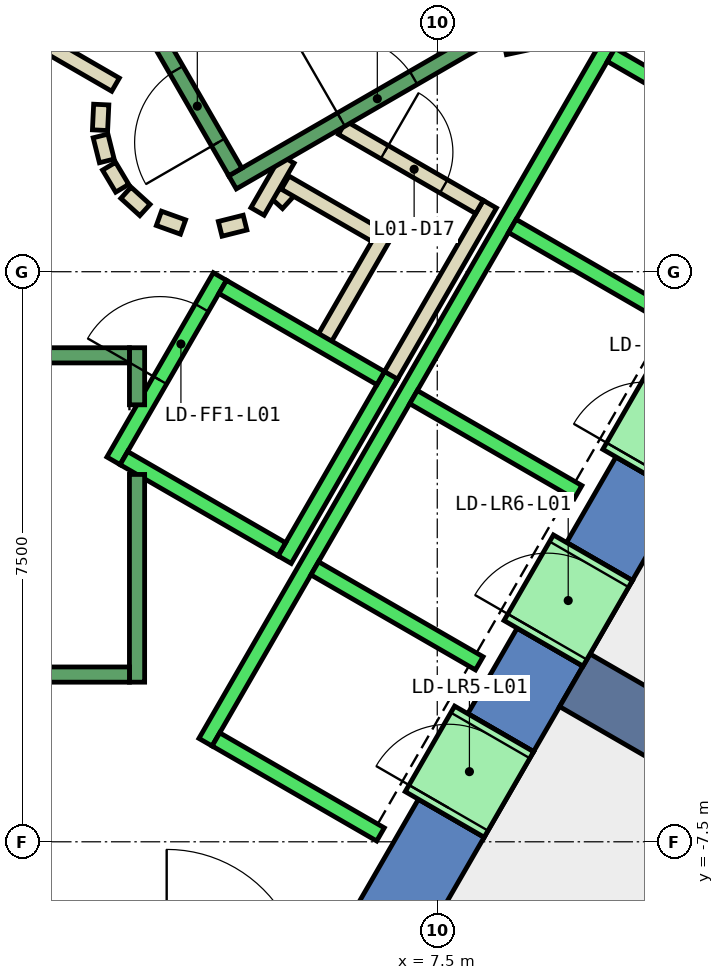
"""IFC4 building model, lengths in metres.
Left out: names, types, materials, properties, quantities, classifications, styles, units other than length and angle.
Written with IfcOpenShell. Run it as: python <this file> out.ifc"""

import sys

from ifc_helpers import new_model, si_unit, direction, frame, frame_2d, origin, place, context, subcontext, project, spatial, polyline, rectangle, outline, extrude, element, fill, save


model = new_model("IFC4")
c1 = context("Model", 3, precision=1e-05, world=origin(), true_north=direction((0.0, 1.0)))
c2 = subcontext(c1, "Body", "Model", "MODEL_VIEW")
j1 = project(units=[si_unit("LENGTHUNIT", "METRE"), si_unit("PLANEANGLEUNIT", "RADIAN")], contexts=[c1])
p1 = place(None, origin())
s1 = spatial("IfcSite", under=j1, at=p1, CompositionType="ELEMENT")
p2 = place(p1, origin())
s2 = spatial("IfcBuilding", under=s1, at=p2, CompositionType="ELEMENT")
p3 = place(p2, frame((0.0, 0.0, 9.0)))
s3 = spatial("IfcBuildingStorey", under=s2, at=p3, CompositionType="ELEMENT", Elevation=9.0)
p4 = place(p3, frame((0.0, 0.0, -0.45)))
e1 = element("IfcWall", 1, at=p4, inside=s3, PredefinedType="SHEAR", context=c2, shape_type="SweptSolid", body=[
    extrude(outline(polyline([(8.517, 11.748), (7.651, 11.248), (12.702, 2.5), (13.856, 2.5), (8.517, 11.748)])), origin(), (0.0, 0.0, 1.0), 6.0),
])
p5 = place(p3, frame((0.0, 0.0, -0.45)))
e2 = element("IfcWall", 2, at=p5, inside=s3, PredefinedType="SHEAR", context=c2, shape_type="SweptSolid", body=[
    extrude(outline(polyline([(8.117, -7.44), (7.252, -6.94), (6.351, -8.5), (6.928, -9.5), (8.117, -7.44)])), origin(), (0.0, 0.0, 1.0), 6.0),
])
p6 = place(p3, frame((0.0, 0.0, -0.45)))
e3 = element("IfcWall", 3, at=p6, inside=s3, PredefinedType="SHEAR", context=c2, shape_type="SweptSolid", body=[
    extrude(outline(polyline([(9.417, -5.189), (8.551, -4.689), (7.902, -5.814), (8.767, -6.314), (9.417, -5.189)])), origin(), (0.0, 0.0, 1.0), 6.0),
])
p7 = place(p3, frame((0.0, 0.0, -0.45)))
e4 = element("IfcWall", 4, at=p7, inside=s3, PredefinedType="SHEAR", context=c2, shape_type="SweptSolid", body=[
    extrude(outline(polyline([(10.717, -2.937), (9.851, -2.437), (9.201, -3.563), (10.067, -4.063), (10.717, -2.937)])), origin(), (0.0, 0.0, 1.0), 6.0),
])
p8 = place(p3, frame((0.0, 0.0, 3.6)))
e5 = element("IfcWall", 5, at=p8, inside=s3, PredefinedType="SHEAR", context=c2, shape_type="SweptSolid", body=[
    extrude(outline(polyline([(8.767, -6.314), (7.902, -5.814), (7.252, -6.94), (8.117, -7.44), (8.767, -6.314)])), origin(), (0.0, 0.0, 1.0), 1.95),
])
p9 = place(p3, frame((0.0, 0.0, 3.6)))
e6 = element("IfcWall", 6, at=p9, inside=s3, PredefinedType="SHEAR", context=c2, shape_type="SweptSolid", body=[
    extrude(outline(polyline([(10.067, -4.063), (9.201, -3.563), (8.551, -4.689), (9.417, -5.189), (10.067, -4.063)])), origin(), (0.0, 0.0, 1.0), 1.95),
])
p10 = place(p3, frame((0.0, 0.0, 3.6)))
e7 = element("IfcWall", 7, at=p10, inside=s3, PredefinedType="SHEAR", context=c2, shape_type="SweptSolid", body=[
    extrude(outline(polyline([(11.367, -1.811), (10.501, -1.311), (9.851, -2.437), (10.717, -2.937), (11.367, -1.811)])), origin(), (0.0, 0.0, 1.0), 1.95),
])
p11 = place(p3, frame((9.31, -5.375, -0.45), z_axis=(0.0, 0.0, 1.0), x_axis=(0.866017533419, -0.500013631625, 0.0)))
e8 = element("IfcWall", 8, at=p11, inside=s3, PredefinedType="SHEAR", context=c2, shape_type="SweptSolid", body=[
    extrude(rectangle(XDim=9.0, YDim=0.8, at=frame_2d((4.5, 0.0))), origin(), (0.0, 0.0, 1.0), 6.0),
])
p12 = place(p3, frame((5.39, 0.898, 0.0), z_axis=(0.0, 0.0, 1.0), x_axis=(0.673828488714, 0.738887791073, 0.0)))
e9 = element("IfcWall", 9, at=p12, inside=s3, PredefinedType="PARTITIONING", context=c2, shape_type="SweptSolid", body=[
    extrude(rectangle(XDim=0.263, YDim=0.2, at=frame_2d((0.131, 0.0))), origin(), (0.0, 0.0, 1.0), 5.55),
])
p13 = place(p3, frame((5.499, 1.172, 0.0), z_axis=(0.0, 0.0, 1.0), x_axis=(0.866333505267, -0.499465972466, 0.0)))
e10 = element("IfcWall", 10, at=p13, inside=s3, PredefinedType="PARTITIONING", context=c2, shape_type="SweptSolid", body=[
    extrude(rectangle(XDim=1.374, YDim=0.2, at=frame_2d((0.687, 0.0))), origin(), (0.0, 0.0, 1.0), 5.55),
])
p14 = place(p3, frame((6.826, 0.522, 0.0), z_axis=(0.0, 0.0, 1.0), x_axis=(-0.500016722714, -0.866015748706, 0.0)))
e11 = element("IfcWall", 11, at=p14, inside=s3, PredefinedType="PARTITIONING", context=c2, shape_type="SweptSolid", body=[
    extrude(rectangle(XDim=1.7, YDim=0.2, at=frame_2d((0.85, 0.0))), origin(), (0.0, 0.0, 1.0), 5.55),
])
p15 = place(p3, frame((8.192, 0.888, 0.0), z_axis=(0.0, 0.0, 1.0), x_axis=(-0.499940625693, -0.866059680843, 0.0)))
e12 = element("IfcWall", 12, at=p15, inside=s3, PredefinedType="PARTITIONING", context=c2, shape_type="SweptSolid", body=[
    extrude(rectangle(XDim=2.68, YDim=0.2, at=frame_2d((1.34, 0.0))), origin(), (0.0, 0.0, 1.0), 5.55),
])
p16 = place(p3, frame((5.135, 0.793, 0.0), z_axis=(0.0, 0.0, 1.0), x_axis=(0.499526442893, 0.866298639529, 0.0)))
e13 = element("IfcWall", 13, at=p16, inside=s3, PredefinedType="PARTITIONING", context=c2, shape_type="SweptSolid", body=[
    extrude(rectangle(XDim=0.791, YDim=0.2, at=frame_2d((0.396, 0.0))), origin(), (0.0, 0.0, 1.0), 5.55),
])
p17 = place(p3, frame((6.25, 1.894, 0.0), z_axis=(0.0, 0.0, 1.0), x_axis=(0.866043184279, -0.499969202016, 0.0)))
e14 = element("IfcWall", 14, at=p17, inside=s3, PredefinedType="PARTITIONING", context=c2, shape_type="SweptSolid", body=[
    extrude(rectangle(XDim=2.084, YDim=0.2, at=frame_2d((1.042, 0.0))), origin(), (0.0, 0.0, 1.0), 5.55),
])
p18 = place(p17, frame((0.642, 0.0, 0.0)))
e15 = element("IfcOpeningElement", 15, at=p18, cuts=e14, PredefinedType="OPENING", context=c2, shape_type="SweptSolid", body=[
    extrude(rectangle(XDim=0.9, YDim=2.1, at=frame_2d((0.45, 1.05))), frame((0.0, 0.11, 0.0), z_axis=(0.0, -1.0, 0.0), x_axis=(1.0, 0.0, 0.0)), (0.0, 0.0, 1.0), 0.22),
])
p19 = place(p3, frame((8.389, 2.954, 0.0), z_axis=(0.0, 0.0, 1.0), x_axis=(0.978158333757, 0.207861189501, 0.0)))
e16 = element("IfcWall", 16, at=p19, inside=s3, PredefinedType="PARTITIONING", context=c2, shape_type="SweptSolid", body=[
    extrude(rectangle(XDim=2.4, YDim=0.2, at=frame_2d((1.2, 0.0))), origin(), (0.0, 0.0, 1.0), 5.55),
])
p20 = place(p3, frame((3.079, 2.199, 0.0), z_axis=(0.0, 0.0, 1.0), x_axis=(-0.047771483479, -0.998858290933, 0.0)))
e17 = element("IfcWall", 17, at=p20, inside=s3, PredefinedType="PARTITIONING", context=c2, shape_type="SweptSolid", body=[
    extrude(rectangle(XDim=0.337, YDim=0.2, at=frame_2d((0.169, 0.0))), origin(), (0.0, 0.0, 1.0), 5.55),
])
p21 = place(p3, frame((3.07, 1.786, 0.0), z_axis=(0.0, 0.0, 1.0), x_axis=(0.242705583207, -0.970099994784, 0.0)))
e18 = element("IfcWall", 18, at=p21, inside=s3, PredefinedType="PARTITIONING", context=c2, shape_type="SweptSolid", body=[
    extrude(rectangle(XDim=0.338, YDim=0.2, at=frame_2d((0.169, 0.0))), origin(), (0.0, 0.0, 1.0), 5.55),
])
for number, where, z_axis, x_axis in (
    (19, (3.182, 1.388, 0.0), (0.0, 0.0, 1.0), (0.512, -0.859, 0.0)),
    (20, (3.404, 1.039, 0.0), (0.0, 0.0, 1.0), (0.74, -0.672, 0.0)),
):
    element("IfcWall", number, at=place(p3, frame(where, z_axis=z_axis, x_axis=x_axis)), inside=s3, PredefinedType="PARTITIONING", context=c2, shape_type="SweptSolid", body=[
        extrude(rectangle(XDim=0.338, YDim=0.2, at=frame_2d((0.169, 0.0))), origin(), (0.0, 0.0, 1.0), 5.55),
    ])
p22 = place(p3, frame((3.838, 0.702, 0.0), z_axis=(0.0, 0.0, 1.0), x_axis=(0.941035081519, -0.338308993895, 0.0)))
e21 = element("IfcWall", 21, at=p22, inside=s3, PredefinedType="PARTITIONING", context=c2, shape_type="SweptSolid", body=[
    extrude(rectangle(XDim=0.337, YDim=0.2, at=frame_2d((0.168, 0.0))), origin(), (0.0, 0.0, 1.0), 5.55),
])
p23 = place(p3, frame((4.644, 0.564, 0.0), z_axis=(0.0, 0.0, 1.0), x_axis=(0.969929076366, 0.243387729394, 0.0)))
e22 = element("IfcWall", 22, at=p23, inside=s3, PredefinedType="PARTITIONING", context=c2, shape_type="SweptSolid", body=[
    extrude(rectangle(XDim=0.337, YDim=0.2, at=frame_2d((0.168, 0.0))), origin(), (0.0, 0.0, 1.0), 5.55),
])
p24 = place(p3, frame((2.012, 3.186, 0.0), z_axis=(0.0, 0.0, 1.0), x_axis=(0.865891012941, -0.500232699559, 0.0)))
e23 = element("IfcWall", 23, at=p24, inside=s3, PredefinedType="PARTITIONING", context=c2, shape_type="SweptSolid", body=[
    extrude(rectangle(XDim=1.449, YDim=0.2, at=frame_2d((0.725, 0.0))), origin(), (0.0, 0.0, 1.0), 5.55),
])
p25 = place(p3, frame((3.24, -2.488, 0.0), z_axis=(0.0, 0.0, 1.0), x_axis=(0.49994636267, 0.866056369097, 0.0)))
e24 = element("IfcWall", 24, at=p25, inside=s3, PredefinedType="STANDARD", context=c2, shape_type="SweptSolid", body=[
    extrude(rectangle(XDim=2.8, YDim=0.2, at=frame_2d((1.4, 0.0))), origin(), (0.0, 0.0, 1.0), 5.55),
])
p26 = place(p25, frame((1.225, 0.0, 0.0)))
e25 = element("IfcOpeningElement", 25, at=p26, cuts=e24, PredefinedType="OPENING", context=c2, shape_type="SweptSolid", body=[
    extrude(rectangle(XDim=1.1, YDim=2.1, at=frame_2d((0.55, 1.05))), frame((0.0, 0.11, 0.0), z_axis=(0.0, -1.0, 0.0), x_axis=(1.0, 0.0, 0.0)), (0.0, 0.0, 1.0), 0.22),
])
p27 = place(p3, frame((5.492, -3.788, 0.0), z_axis=(0.0, 0.0, 1.0), x_axis=(0.500011755427, 0.866018616679, 0.0)))
e26 = element("IfcWall", 26, at=p27, inside=s3, PredefinedType="STANDARD", context=c2, shape_type="SweptSolid", body=[
    extrude(rectangle(XDim=2.8, YDim=0.2, at=frame_2d((1.4, 0.0))), origin(), (0.0, 0.0, 1.0), 5.55),
])
p28 = place(p3, frame((3.377, -2.452, 0.0), z_axis=(0.0, 0.0, 1.0), x_axis=(0.865955154139, -0.50012165622, 0.0)))
e27 = element("IfcWall", 27, at=p28, inside=s3, PredefinedType="STANDARD", context=c2, shape_type="SweptSolid", body=[
    extrude(rectangle(XDim=2.4, YDim=0.2, at=frame_2d((1.2, 0.0))), origin(), (0.0, 0.0, 1.0), 5.55),
])
p29 = place(p3, frame((4.677, -0.2, 0.0), z_axis=(0.0, 0.0, 1.0), x_axis=(0.865973769406, -0.500089422704, 0.0)))
e28 = element("IfcWall", 28, at=p29, inside=s3, PredefinedType="STANDARD", context=c2, shape_type="SweptSolid", body=[
    extrude(rectangle(XDim=2.399, YDim=0.2, at=frame_2d((1.2, 0.0))), origin(), (0.0, 0.0, 1.0), 5.55),
])
p30 = place(p3, frame((4.451, -6.19, 0.0), z_axis=(0.0, 0.0, 1.0), x_axis=(0.50000090737, 0.866024879913, 0.0)))
e29 = element("IfcWall", 29, at=p30, inside=s3, PredefinedType="STANDARD", context=c2, shape_type="SweptSolid", body=[
    extrude(rectangle(XDim=10.6, YDim=0.2, at=frame_2d((5.3, 0.0))), origin(), (0.0, 0.0, 1.0), 5.55),
])
for number, where, z_axis, x_axis in (
    (30, (4.588, -6.153, 0.0), (0.0, 0.0, 1.0), (0.866, -0.5, 0.0)),
    (31, (5.888, -3.902, 0.0), (0.0, 0.0, 1.0), (0.866, -0.5, 0.0)),
    (32, (7.188, -1.65, 0.0), (0.0, 0.0, 1.0), (0.866, -0.5, 0.0)),
    (33, (8.488, 0.602, 0.0), (0.0, 0.0, 1.0), (0.866, -0.5, 0.0)),
):
    element("IfcWall", number, at=place(p3, frame(where, z_axis=z_axis, x_axis=x_axis)), inside=s3, PredefinedType="STANDARD", context=c2, shape_type="SweptSolid", body=[
        extrude(rectangle(XDim=2.5, YDim=0.2, at=frame_2d((1.25, 0.0))), origin(), (0.0, 0.0, 1.0), 5.55),
    ])
p31 = place(p3, frame((9.788, 2.853, 0.0), z_axis=(0.0, 0.0, 1.0), x_axis=(0.865998541277, -0.500046524342, 0.0)))
e34 = element("IfcWall", 34, at=p31, inside=s3, PredefinedType="STANDARD", context=c2, shape_type="SweptSolid", body=[
    extrude(rectangle(XDim=2.5, YDim=0.2, at=frame_2d((1.25, 0.0))), origin(), (0.0, 0.0, 1.0), 5.55),
])
p32 = place(p3, frame((7.598, -7.14, 0.0), z_axis=(0.0, 0.0, 1.0), x_axis=(0.500362116554, 0.865816234728, 0.0)))
e35 = element("IfcWall", 35, at=p32, inside=s3, PredefinedType="STANDARD", context=c2, shape_type="SweptSolid", body=[
    extrude(rectangle(XDim=1.299, YDim=1.2, at=frame_2d((0.65, 0.0))), origin(), (0.0, 0.0, 1.0), 2.4),
])
p33 = place(p32, frame((0.1, 0.0, 0.0)))
e36 = element("IfcOpeningElement", 36, at=p33, cuts=e35, PredefinedType="OPENING", context=c2, shape_type="SweptSolid", body=[
    extrude(rectangle(XDim=1.1, YDim=2.3, at=frame_2d((0.55, 1.15))), frame((0.0, 0.61, 0.0), z_axis=(0.0, -1.0, 0.0), x_axis=(1.0, 0.0, 0.0)), (0.0, 0.0, 1.0), 1.22),
])
p34 = place(p3, frame((8.898, -4.889, 0.0), z_axis=(0.0, 0.0, 1.0), x_axis=(0.500036693733, 0.866004217611, 0.0)))
e37 = element("IfcWall", 37, at=p34, inside=s3, PredefinedType="STANDARD", context=c2, shape_type="SweptSolid", body=[
    extrude(rectangle(XDim=1.3, YDim=1.2, at=frame_2d((0.65, 0.0))), origin(), (0.0, 0.0, 1.0), 2.4),
])
p35 = place(p34, frame((0.1, 0.0, 0.0)))
e38 = element("IfcOpeningElement", 38, at=p35, cuts=e37, PredefinedType="OPENING", context=c2, shape_type="SweptSolid", body=[
    extrude(rectangle(XDim=1.1, YDim=2.3, at=frame_2d((0.55, 1.15))), frame((0.0, 0.61, 0.0), z_axis=(0.0, -1.0, 0.0), x_axis=(1.0, 0.0, 0.0)), (0.0, 0.0, 1.0), 1.22),
])
p36 = place(p3, frame((10.198, -2.637, 0.0), z_axis=(0.0, 0.0, 1.0), x_axis=(0.49989585183, 0.866085525409, 0.0)))
e39 = element("IfcWall", 39, at=p36, inside=s3, PredefinedType="STANDARD", context=c2, shape_type="SweptSolid", body=[
    extrude(rectangle(XDim=1.3, YDim=1.2, at=frame_2d((0.65, 0.0))), origin(), (0.0, 0.0, 1.0), 2.4),
])
p37 = place(p36, frame((0.1, 0.0, 0.0)))
e40 = element("IfcOpeningElement", 40, at=p37, cuts=e39, PredefinedType="OPENING", context=c2, shape_type="SweptSolid", body=[
    extrude(rectangle(XDim=1.1, YDim=2.3, at=frame_2d((0.55, 1.15))), frame((0.0, 0.61, 0.0), z_axis=(0.0, -1.0, 0.0), x_axis=(1.0, 0.0, 0.0)), (0.0, 0.0, 1.0), 1.22),
])
p38 = place(p3, frame((3.55, -2.667, 0.0), z_axis=(0.0, 0.0, 1.0), x_axis=(0.0, -1.0, 0.0)))
e41 = element("IfcWall", 41, at=p38, inside=s3, PredefinedType="STANDARD", context=c2, shape_type="SweptSolid", body=[
    extrude(rectangle(XDim=2.733, YDim=0.2, at=frame_2d((1.366, 0.0))), origin(), (0.0, 0.0, 1.0), 5.55),
])
p39 = place(p3, frame((3.55, -1.0, 0.0), z_axis=(0.0, 0.0, 1.0), x_axis=(0.0, -1.0, 0.0)))
e42 = element("IfcWall", 42, at=p39, inside=s3, PredefinedType="STANDARD", context=c2, shape_type="SweptSolid", body=[
    extrude(rectangle(XDim=0.751, YDim=0.2, at=frame_2d((0.375, 0.0))), origin(), (0.0, 0.0, 1.0), 5.55),
])
p40 = place(p3, frame((-3.45, -1.1, 0.0), z_axis=(0.0, 0.0, 1.0), x_axis=(1.0, 0.0, 0.0)))
e43 = element("IfcWall", 43, at=p40, inside=s3, PredefinedType="STANDARD", context=c2, shape_type="SweptSolid", body=[
    extrude(rectangle(XDim=6.9, YDim=0.2, at=frame_2d((3.45, 0.0))), origin(), (0.0, 0.0, 1.0), 5.55),
])
p41 = place(p40, frame((0.45, 0.0, 0.0)))
e44 = element("IfcOpeningElement", 44, at=p41, cuts=e43, PredefinedType="OPENING", context=c2, shape_type="SweptSolid", body=[
    extrude(rectangle(XDim=1.1, YDim=2.2, at=frame_2d((0.55, 1.1))), frame((0.0, 0.11, 0.0), z_axis=(0.0, -1.0, 0.0), x_axis=(1.0, 0.0, 0.0)), (0.0, 0.0, 1.0), 0.22),
])
p42 = place(p3, frame((-3.45, -5.3, 0.0), z_axis=(0.0, 0.0, 1.0), x_axis=(1.0, 0.0, 0.0)))
e45 = element("IfcWall", 45, at=p42, inside=s3, PredefinedType="STANDARD", context=c2, shape_type="SweptSolid", body=[
    extrude(rectangle(XDim=6.9, YDim=0.2, at=frame_2d((3.45, 0.0))), origin(), (0.0, 0.0, 1.0), 5.55),
])
p43 = place(p3, frame((4.806, 1.176, 0.0), z_axis=(0.0, 0.0, 1.0), x_axis=(0.866059941101, 0.499940174841, 0.0)))
e46 = element("IfcWall", 46, at=p43, inside=s3, PredefinedType="STANDARD", context=c2, shape_type="SweptSolid", body=[
    extrude(rectangle(XDim=4.4, YDim=0.2, at=frame_2d((2.2, 0.0))), origin(), (0.0, 0.0, 1.0), 5.55),
])
p44 = place(p43, frame((1.65, 0.0, 0.0)))
e47 = element("IfcOpeningElement", 47, at=p44, cuts=e46, PredefinedType="OPENING", context=c2, shape_type="SweptSolid", body=[
    extrude(rectangle(XDim=1.1, YDim=2.2, at=frame_2d((0.55, 1.1))), frame((0.0, 0.11, 0.0), z_axis=(0.0, -1.0, 0.0), x_axis=(1.0, 0.0, 0.0)), (0.0, 0.0, 1.0), 0.22),
])
p45 = place(p3, frame((4.843, 1.312, 0.0), z_axis=(0.0, 0.0, 1.0), x_axis=(-0.499963383562, 0.866046543262, 0.0)))
e48 = element("IfcWall", 48, at=p45, inside=s3, PredefinedType="STANDARD", context=c2, shape_type="SweptSolid", body=[
    extrude(rectangle(XDim=6.9, YDim=0.2, at=frame_2d((3.45, 0.0))), origin(), (0.0, 0.0, 1.0), 5.55),
])
p46 = place(p45, frame((0.45, 0.0, 0.0)))
e49 = element("IfcOpeningElement", 49, at=p46, cuts=e48, PredefinedType="OPENING", context=c2, shape_type="SweptSolid", body=[
    extrude(rectangle(XDim=1.1, YDim=2.2, at=frame_2d((0.55, 1.1))), frame((0.0, 0.11, 0.0), z_axis=(0.0, -1.0, 0.0), x_axis=(1.0, 0.0, 0.0)), (0.0, 0.0, 1.0), 0.22),
])
p47 = place(p18, origin())
e50 = element("IfcDoor", 50, at=p47, inside=s3, OperationType="SINGLE_SWING_LEFT", PredefinedType="DOOR", context=c2, shape_type="SweptSolid", body=[
    extrude(rectangle(XDim=0.9, YDim=2.1, at=frame_2d((0.45, 1.05))), frame((0.0, 0.025, 0.0), z_axis=(0.0, -1.0, 0.0), x_axis=(1.0, 0.0, 0.0)), (0.0, 0.0, 1.0), 0.05),
])
fill(e15, e50)
p48 = place(p33, origin())
e51 = element("IfcDoor", 51, at=p48, inside=s3, OperationType="SLIDING_TO_LEFT", PredefinedType="DOOR", context=c2, shape_type="SweptSolid", body=[
    extrude(rectangle(XDim=1.1, YDim=2.3, at=frame_2d((0.55, 1.15))), frame((0.0, 0.025, 0.0), z_axis=(0.0, -1.0, 0.0), x_axis=(1.0, 0.0, 0.0)), (0.0, 0.0, 1.0), 0.05),
])
fill(e36, e51)
p49 = place(p35, origin())
e52 = element("IfcDoor", 52, at=p49, inside=s3, OperationType="SLIDING_TO_LEFT", PredefinedType="DOOR", context=c2, shape_type="SweptSolid", body=[
    extrude(rectangle(XDim=1.1, YDim=2.3, at=frame_2d((0.55, 1.15))), frame((0.0, 0.025, 0.0), z_axis=(0.0, -1.0, 0.0), x_axis=(1.0, 0.0, 0.0)), (0.0, 0.0, 1.0), 0.05),
])
fill(e38, e52)
p50 = place(p26, origin())
e53 = element("IfcDoor", 53, at=p50, inside=s3, OperationType="SLIDING_TO_LEFT", PredefinedType="DOOR", context=c2, shape_type="SweptSolid", body=[
    extrude(rectangle(XDim=1.1, YDim=2.1, at=frame_2d((0.55, 1.05))), frame((0.0, 0.025, 0.0), z_axis=(0.0, -1.0, 0.0), x_axis=(1.0, 0.0, 0.0)), (0.0, 0.0, 1.0), 0.05),
])
fill(e25, e53)
p51 = place(p46, origin())
e54 = element("IfcDoor", 54, at=p51, inside=s3, OperationType="SINGLE_SWING_LEFT", PredefinedType="DOOR", context=c2, shape_type="SweptSolid", body=[
    extrude(rectangle(XDim=1.1, YDim=2.2, at=frame_2d((0.55, 1.1))), frame((0.0, 0.025, 0.0), z_axis=(0.0, -1.0, 0.0), x_axis=(1.0, 0.0, 0.0)), (0.0, 0.0, 1.0), 0.05),
])
fill(e49, e54)
p52 = place(p44, origin())
e55 = element("IfcDoor", 55, at=p52, inside=s3, OperationType="SINGLE_SWING_LEFT", PredefinedType="DOOR", context=c2, shape_type="SweptSolid", body=[
    extrude(rectangle(XDim=1.1, YDim=2.2, at=frame_2d((0.55, 1.1))), frame((0.0, 0.025, 0.0), z_axis=(0.0, -1.0, 0.0), x_axis=(1.0, 0.0, 0.0)), (0.0, 0.0, 1.0), 0.05),
])
fill(e47, e55)
save(model, sys.argv[1])
